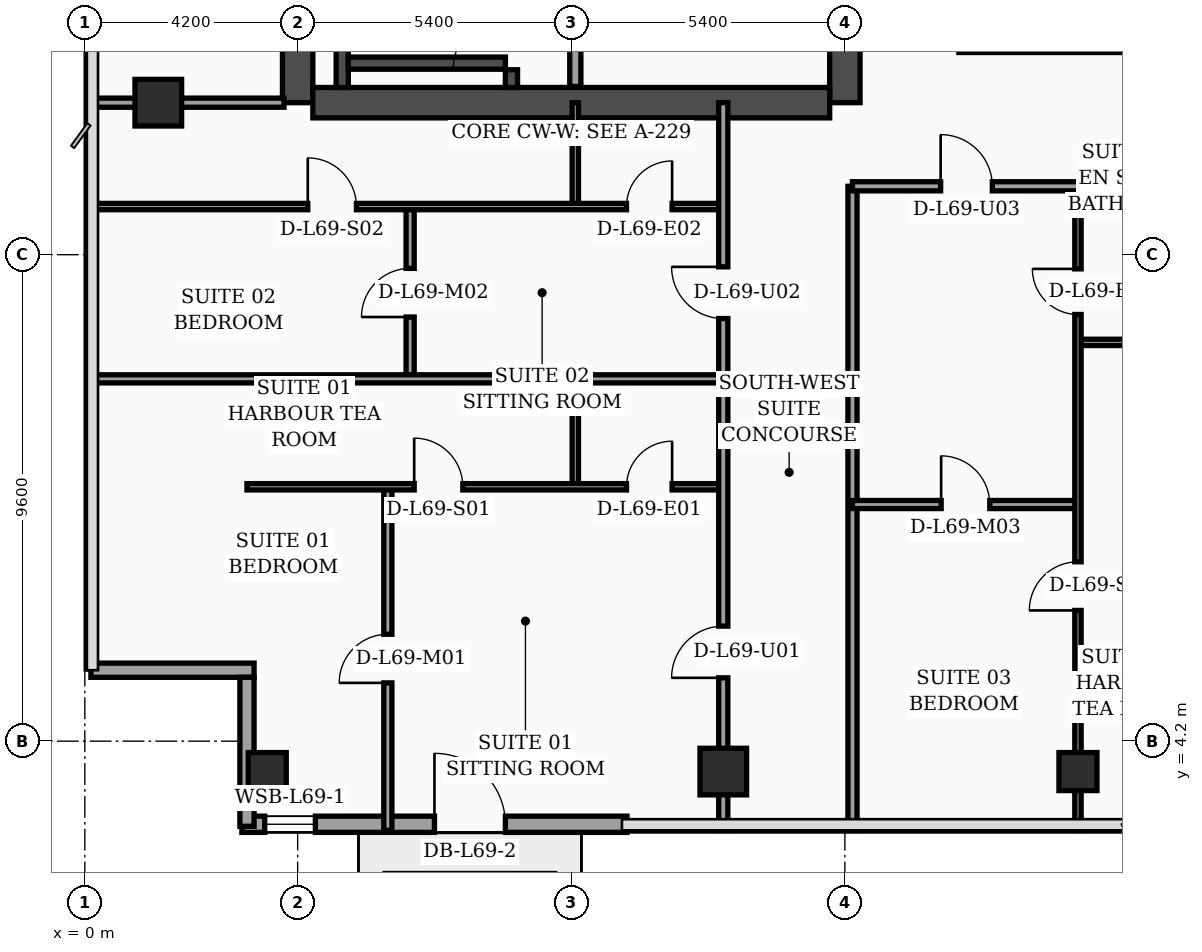
"""IFC4 building model, lengths in metres.
Left out: names, types, materials, properties, quantities, classifications, styles, units other than length and angle.
Written with IfcOpenShell. Run it as: python <this file> out.ifc"""

import sys

from ifc_helpers import new_model, si_unit, direction, frame, frame_2d, origin, origin_2d, place, context, subcontext, project, spatial, rectangle, hollow_rectangle, extrude, element, fill, save


model = new_model("IFC4")
c1 = context("Model", 3, precision=1e-05, world=origin(), true_north=direction((0.0, 1.0)))
c2 = subcontext(c1, "Body", "Model", "MODEL_VIEW")
j1 = project(units=[si_unit("LENGTHUNIT", "METRE"), si_unit("PLANEANGLEUNIT", "RADIAN")], contexts=[c1])
p1 = place(None, origin())
s1 = spatial("IfcSite", under=j1, at=p1, CompositionType="ELEMENT")
p2 = place(p1, origin())
s2 = spatial("IfcBuilding", under=s1, at=p2, CompositionType="ELEMENT")
p3 = place(p2, frame((0.0, 0.0, 278.7)))
s3 = spatial("IfcBuildingStorey", under=s2, at=p3, CompositionType="ELEMENT", Elevation=278.7)
p4 = place(p3, frame((4.2, 16.8, 0.0), z_axis=(0.0, 0.0, 1.0), x_axis=(0.0, 1.0, 0.0)))
e1 = element("IfcWall", 1, at=p4, inside=s3, PredefinedType="SHEAR", context=c2, shape_type="SweptSolid", body=[
    extrude(rectangle(XDim=21.6, YDim=0.6, at=frame_2d((10.8, 0.0))), origin(), (0.0, 0.0, 1.0), 3.52),
])
p5 = place(p3, frame((15.0, 16.8, 0.0), z_axis=(0.0, 0.0, 1.0), x_axis=(0.0, 1.0, 0.0)))
e2 = element("IfcWall", 2, at=p5, inside=s3, PredefinedType="SHEAR", context=c2, shape_type="SweptSolid", body=[
    extrude(rectangle(XDim=21.6, YDim=0.6, at=frame_2d((10.8, 0.0))), origin(), (0.0, 0.0, 1.0), 3.52),
])
p6 = place(p5, frame((8.65, 0.0, 0.0)))
e3 = element("IfcOpeningElement", 3, at=p6, cuts=e2, PredefinedType="OPENING", context=c2, shape_type="SweptSolid", body=[
    extrude(rectangle(XDim=1.1, YDim=2.2, at=frame_2d((0.55, 1.1))), frame((0.0, 0.31, 0.0), z_axis=(0.0, -1.0, 0.0), x_axis=(1.0, 0.0, 0.0)), (0.0, 0.0, 1.0), 0.62),
])
p7 = place(p5, frame((18.9, 0.0, 0.0)))
e4 = element("IfcOpeningElement", 4, at=p7, cuts=e2, PredefinedType="OPENING", context=c2, shape_type="SweptSolid", body=[
    extrude(rectangle(XDim=1.1, YDim=2.2, at=frame_2d((0.55, 1.1))), frame((0.0, 0.31, 0.0), z_axis=(0.0, -1.0, 0.0), x_axis=(1.0, 0.0, 0.0)), (0.0, 0.0, 1.0), 0.62),
])
p8 = place(p3, frame((4.5, 16.8, 0.0), z_axis=(0.0, 0.0, 1.0), x_axis=(1.0, 0.0, 0.0)))
e5 = element("IfcWall", 5, at=p8, inside=s3, PredefinedType="SHEAR", context=c2, shape_type="SweptSolid", body=[
    extrude(rectangle(XDim=10.2, YDim=0.6, at=frame_2d((5.1, 0.0))), origin(), (0.0, 0.0, 1.0), 3.52),
])
p9 = place(p3, frame((5.08, 17.1, 0.0), z_axis=(0.0, 0.0, 1.0), x_axis=(0.0, 1.0, 0.0)))
e6 = element("IfcWall", 6, at=p9, inside=s3, PredefinedType="SOLIDWALL", context=c2, shape_type="SweptSolid", body=[
    extrude(rectangle(XDim=9.69, YDim=0.24, at=frame_2d((4.845, 0.0))), origin(), (0.0, 0.0, 1.0), 3.52),
])
p10 = place(p3, frame((8.42, 17.1, 0.0), z_axis=(0.0, 0.0, 1.0), x_axis=(0.0, 1.0, 0.0)))
e7 = element("IfcWall", 7, at=p10, inside=s3, PredefinedType="SOLIDWALL", context=c2, shape_type="SweptSolid", body=[
    extrude(rectangle(XDim=9.69, YDim=0.24, at=frame_2d((4.845, 0.0))), origin(), (0.0, 0.0, 1.0), 3.52),
])
p11 = place(p10, frame((0.35, 0.0, 0.0)))
e8 = element("IfcOpeningElement", 8, at=p11, cuts=e7, PredefinedType="OPENING", context=c2, shape_type="SweptSolid", body=[
    extrude(rectangle(XDim=1.15, YDim=2.2, at=frame_2d((0.575, 1.1))), frame((0.0, 0.13, 0.0), z_axis=(0.0, -1.0, 0.0), x_axis=(1.0, 0.0, 0.0)), (0.0, 0.0, 1.0), 0.26),
])
p12 = place(p3, frame((5.2, 17.58, 0.0), z_axis=(0.0, 0.0, 1.0), x_axis=(1.0, 0.0, 0.0)))
e9 = element("IfcWall", 9, at=p12, inside=s3, PredefinedType="SOLIDWALL", context=c2, shape_type="SweptSolid", body=[
    extrude(rectangle(XDim=3.1, YDim=0.24, at=frame_2d((1.55, 0.0))), origin(), (0.0, 0.0, 1.0), 3.52),
])
p13 = place(p3, frame((3.6, 3.6, 0.0), z_axis=(0.0, 0.0, 1.0), x_axis=(1.0, 0.0, 0.0)))
e10 = element("IfcColumn", 10, at=p13, inside=s3, PredefinedType="COLUMN", context=c2, shape_type="SweptSolid", body=[
    extrude(hollow_rectangle(XDim=0.75, YDim=0.75, WallThickness=0.032, at=origin_2d()), origin(), (0.0, 0.0, 1.0), 3.52),
])
for number, where, z_axis, x_axis in (
    (11, (1.45, 16.8, 0.0), (0.0, 0.0, 1.0), (1.0, 0.0, 0.0)),
    (12, (12.6, 3.6, 0.0), (0.0, 0.0, 1.0), (1.0, 0.0, 0.0)),
):
    element("IfcColumn", number, at=place(p3, frame(where, z_axis=z_axis, x_axis=x_axis)), inside=s3, PredefinedType="COLUMN", context=c2, shape_type="SweptSolid", body=[
        extrude(rectangle(XDim=0.92, YDim=0.92, at=origin_2d()), origin(), (0.0, 0.0, 1.0), 3.52),
    ])
p14 = place(p3, frame((19.6, 3.6, 0.0), z_axis=(0.0, 0.0, 1.0), x_axis=(1.0, 0.0, 0.0)))
e13 = element("IfcColumn", 13, at=p14, inside=s3, PredefinedType="COLUMN", context=c2, shape_type="SweptSolid", body=[
    extrude(hollow_rectangle(XDim=0.75, YDim=0.75, WallThickness=0.032, at=origin_2d()), origin(), (0.0, 0.0, 1.0), 3.52),
])
p15 = place(p3, frame((3.1, 2.56, 0.0), z_axis=(0.0, 0.0, 1.0), x_axis=(1.0, 0.0, 0.0)))
e14 = element("IfcWall", 14, at=p15, inside=s3, PredefinedType="SOLIDWALL", context=c2, shape_type="SweptSolid", body=[
    extrude(rectangle(XDim=7.6, YDim=0.32, at=frame_2d((3.8, 0.0))), origin(), (0.0, 0.0, 1.0), 3.52),
])
p16 = place(p15, frame((0.45, 0.0, 0.75)))
e15 = element("IfcOpeningElement", 15, at=p16, cuts=e14, PredefinedType="OPENING", context=c2, shape_type="SweptSolid", body=[
    extrude(rectangle(XDim=1.0, YDim=1.6, at=frame_2d((0.5, 0.8))), frame((0.0, 0.17, 0.0), z_axis=(0.0, -1.0, 0.0), x_axis=(1.0, 0.0, 0.0)), (0.0, 0.0, 1.0), 0.34),
])
p17 = place(p15, frame((3.8, 0.0, 0.0)))
e16 = element("IfcOpeningElement", 16, at=p17, cuts=e14, PredefinedType="OPENING", context=c2, shape_type="SweptSolid", body=[
    extrude(rectangle(XDim=1.4, YDim=2.25, at=frame_2d((0.7, 1.125))), frame((0.0, 0.17, 0.0), z_axis=(0.0, -1.0, 0.0), x_axis=(1.0, 0.0, 0.0)), (0.0, 0.0, 1.0), 0.34),
])
p18 = place(p3, frame((0.12, 5.6, 0.0), z_axis=(0.0, 0.0, 1.0), x_axis=(1.0, 0.0, 0.0)))
e17 = element("IfcWall", 17, at=p18, inside=s3, PredefinedType="SOLIDWALL", context=c2, shape_type="SweptSolid", body=[
    extrude(rectangle(XDim=3.22, YDim=0.28, at=frame_2d((1.61, 0.0))), origin(), (0.0, 0.0, 1.0), 2.97),
])
p19 = place(p3, frame((3.2, 5.46, 0.0), z_axis=(0.0, 0.0, 1.0), x_axis=(0.0, -1.0, 0.0)))
e18 = element("IfcWall", 18, at=p19, inside=s3, PredefinedType="SOLIDWALL", context=c2, shape_type="SweptSolid", body=[
    extrude(rectangle(XDim=2.94, YDim=0.28, at=frame_2d((1.47, 0.0))), origin(), (0.0, 0.0, 1.0), 2.97),
])
p20 = place(p3, frame((9.68, 17.12, 0.0), z_axis=(0.0, 0.0, 1.0), x_axis=(0.0, 1.0, 0.0)))
e19 = element("IfcWall", 19, at=p20, inside=s3, PredefinedType="SOLIDWALL", context=c2, shape_type="SweptSolid", body=[
    extrude(rectangle(XDim=7.88, YDim=0.22, at=frame_2d((3.94, 0.0))), origin(), (0.0, 0.0, 1.0), 3.52),
])
p21 = place(p3, frame((0.08, 16.8, 0.0), z_axis=(0.0, 0.0, 1.0), x_axis=(1.0, 0.0, 0.0)))
e20 = element("IfcWall", 20, at=p21, inside=s3, PredefinedType="PARTITIONING", context=c2, shape_type="SweptSolid", body=[
    extrude(rectangle(XDim=3.85, YDim=0.18, at=frame_2d((1.925, 0.0))), origin(), (0.0, 0.0, 1.0), 2.97),
])
p22 = place(p3, frame((9.68, 9.22, 0.0), z_axis=(0.0, 0.0, 1.0), x_axis=(0.0, 1.0, 0.0)))
e21 = element("IfcWall", 21, at=p22, inside=s3, PredefinedType="PARTITIONING", context=c2, shape_type="SweptSolid", body=[
    extrude(rectangle(XDim=2.13, YDim=0.125, at=frame_2d((1.065, 0.0))), origin(), (0.0, 0.0, 1.0), 3.12),
])
p23 = place(p3, frame((5.98, 2.44, 0.0), z_axis=(0.0, 0.0, 1.0), x_axis=(0.0, 1.0, 0.0)))
e22 = element("IfcWall", 22, at=p23, inside=s3, PredefinedType="PARTITIONING", context=c2, shape_type="SweptSolid", body=[
    extrude(rectangle(XDim=6.78, YDim=0.16, at=frame_2d((3.39, 0.0))), origin(), (0.0, 0.0, 1.0), 3.07),
])
p24 = place(p23, frame((2.91, 0.0, 0.0)))
e23 = element("IfcOpeningElement", 23, at=p24, cuts=e22, PredefinedType="OPENING", context=c2, shape_type="SweptSolid", body=[
    extrude(rectangle(XDim=0.96, YDim=2.2, at=frame_2d((0.48, 1.1))), frame((0.0, 0.09, 0.0), z_axis=(0.0, -1.0, 0.0), x_axis=(1.0, 0.0, 0.0)), (0.0, 0.0, 1.0), 0.18),
])
p25 = place(p3, frame((3.2, 9.22, 0.0), z_axis=(0.0, 0.0, 1.0), x_axis=(1.0, 0.0, 0.0)))
e24 = element("IfcWall", 24, at=p25, inside=s3, PredefinedType="PARTITIONING", context=c2, shape_type="SweptSolid", body=[
    extrude(rectangle(XDim=9.4, YDim=0.125, at=frame_2d((4.7, 0.0))), origin(), (0.0, 0.0, 1.0), 2.97),
])
p26 = place(p25, frame((3.3, 0.0, 0.0)))
e25 = element("IfcOpeningElement", 25, at=p26, cuts=e24, PredefinedType="OPENING", context=c2, shape_type="SweptSolid", body=[
    extrude(rectangle(XDim=0.96, YDim=2.2, at=frame_2d((0.48, 1.1))), frame((0.0, 0.073, 0.0), z_axis=(0.0, -1.0, 0.0), x_axis=(1.0, 0.0, 0.0)), (0.0, 0.0, 1.0), 0.145),
])
p27 = place(p25, frame((7.49, 0.0, 0.0)))
e26 = element("IfcOpeningElement", 26, at=p27, cuts=e24, PredefinedType="OPENING", context=c2, shape_type="SweptSolid", body=[
    extrude(rectangle(XDim=0.9, YDim=2.15, at=frame_2d((0.45, 1.075))), frame((0.0, 0.073, 0.0), z_axis=(0.0, -1.0, 0.0), x_axis=(1.0, 0.0, 0.0)), (0.0, 0.0, 1.0), 0.145),
])
p28 = place(p3, frame((9.68, 14.75, 0.0), z_axis=(0.0, 0.0, 1.0), x_axis=(0.0, 1.0, 0.0)))
e27 = element("IfcWall", 27, at=p28, inside=s3, PredefinedType="PARTITIONING", context=c2, shape_type="SweptSolid", body=[
    extrude(rectangle(XDim=2.05, YDim=0.125, at=frame_2d((1.025, 0.0))), origin(), (0.0, 0.0, 1.0), 3.52),
])
p29 = place(p3, frame((6.42, 11.35, 0.0), z_axis=(0.0, 0.0, 1.0), x_axis=(0.0, 1.0, 0.0)))
e28 = element("IfcWall", 28, at=p29, inside=s3, PredefinedType="PARTITIONING", context=c2, shape_type="SweptSolid", body=[
    extrude(rectangle(XDim=3.4, YDim=0.16, at=frame_2d((1.7, 0.0))), origin(), (0.0, 0.0, 1.0), 3.52),
])
p30 = place(p29, frame((1.22, 0.0, 0.0)))
e29 = element("IfcOpeningElement", 29, at=p30, cuts=e28, PredefinedType="OPENING", context=c2, shape_type="SweptSolid", body=[
    extrude(rectangle(XDim=0.96, YDim=2.2, at=frame_2d((0.48, 1.1))), frame((0.0, 0.09, 0.0), z_axis=(0.0, -1.0, 0.0), x_axis=(1.0, 0.0, 0.0)), (0.0, 0.0, 1.0), 0.18),
])
p31 = place(p3, frame((0.08, 14.75, 0.0), z_axis=(0.0, 0.0, 1.0), x_axis=(1.0, 0.0, 0.0)))
e30 = element("IfcWall", 30, at=p31, inside=s3, PredefinedType="PARTITIONING", context=c2, shape_type="SweptSolid", body=[
    extrude(rectangle(XDim=12.52, YDim=0.125, at=frame_2d((6.26, 0.0))), origin(), (0.0, 0.0, 1.0), 2.97),
])
p32 = place(p31, frame((4.32, 0.0, 0.0)))
e31 = element("IfcOpeningElement", 31, at=p32, cuts=e30, PredefinedType="OPENING", context=c2, shape_type="SweptSolid", body=[
    extrude(rectangle(XDim=0.96, YDim=2.2, at=frame_2d((0.48, 1.1))), frame((0.0, 0.073, 0.0), z_axis=(0.0, -1.0, 0.0), x_axis=(1.0, 0.0, 0.0)), (0.0, 0.0, 1.0), 0.145),
])
p33 = place(p31, frame((10.61, 0.0, 0.0)))
e32 = element("IfcOpeningElement", 32, at=p33, cuts=e30, PredefinedType="OPENING", context=c2, shape_type="SweptSolid", body=[
    extrude(rectangle(XDim=0.9, YDim=2.15, at=frame_2d((0.45, 1.075))), frame((0.0, 0.073, 0.0), z_axis=(0.0, -1.0, 0.0), x_axis=(1.0, 0.0, 0.0)), (0.0, 0.0, 1.0), 0.145),
])
p34 = place(p3, frame((0.08, 11.35, 0.0), z_axis=(0.0, 0.0, 1.0), x_axis=(1.0, 0.0, 0.0)))
e33 = element("IfcWall", 33, at=p34, inside=s3, PredefinedType="PARTITIONING", context=c2, shape_type="SweptSolid", body=[
    extrude(rectangle(XDim=12.52, YDim=0.16, at=frame_2d((6.26, 0.0))), origin(), (0.0, 0.0, 1.0), 2.97),
])
p35 = place(p3, frame((12.6, 2.44, 0.0), z_axis=(0.0, 0.0, 1.0), x_axis=(0.0, 1.0, 0.0)))
e34 = element("IfcWall", 34, at=p35, inside=s3, PredefinedType="PARTITIONING", context=c2, shape_type="SweptSolid", body=[
    extrude(rectangle(XDim=14.36, YDim=0.18, at=frame_2d((7.18, 0.0))), origin(), (0.0, 0.0, 1.0), 2.97),
])
p36 = place(p35, frame((3.01, 0.0, 0.0)))
e35 = element("IfcOpeningElement", 35, at=p36, cuts=e34, PredefinedType="OPENING", context=c2, shape_type="SweptSolid", body=[
    extrude(rectangle(XDim=1.02, YDim=2.2, at=frame_2d((0.51, 1.1))), frame((0.0, 0.1, 0.0), z_axis=(0.0, -1.0, 0.0), x_axis=(1.0, 0.0, 0.0)), (0.0, 0.0, 1.0), 0.2),
])
p37 = place(p35, frame((10.1, 0.0, 0.0)))
e36 = element("IfcOpeningElement", 36, at=p37, cuts=e34, PredefinedType="OPENING", context=c2, shape_type="SweptSolid", body=[
    extrude(rectangle(XDim=1.02, YDim=2.2, at=frame_2d((0.51, 1.1))), frame((0.0, 0.1, 0.0), z_axis=(0.0, -1.0, 0.0), x_axis=(1.0, 0.0, 0.0)), (0.0, 0.0, 1.0), 0.2),
])
p38 = place(p3, frame((15.15, 2.44, 0.0), z_axis=(0.0, 0.0, 1.0), x_axis=(0.0, 1.0, 0.0)))
e37 = element("IfcWall", 37, at=p38, inside=s3, PredefinedType="PARTITIONING", context=c2, shape_type="SweptSolid", body=[
    extrude(rectangle(XDim=12.71, YDim=0.18, at=frame_2d((6.355, 0.0))), origin(), (0.0, 0.0, 1.0), 3.07),
])
p39 = place(p3, frame((19.6, 12.07, 0.0), z_axis=(0.0, 0.0, 1.0), x_axis=(1.0, 0.0, 0.0)))
e38 = element("IfcWall", 38, at=p39, inside=s3, PredefinedType="PARTITIONING", context=c2, shape_type="SweptSolid", body=[
    extrude(rectangle(XDim=2.0, YDim=0.125, at=frame_2d((1.0, 0.0))), origin(), (0.0, 0.0, 1.0), 3.52),
])
p40 = place(p3, frame((15.15, 8.87, 0.0), z_axis=(0.0, 0.0, 1.0), x_axis=(1.0, 0.0, 0.0)))
e39 = element("IfcWall", 39, at=p40, inside=s3, PredefinedType="PARTITIONING", context=c2, shape_type="SweptSolid", body=[
    extrude(rectangle(XDim=4.45, YDim=0.16, at=frame_2d((2.225, 0.0))), origin(), (0.0, 0.0, 1.0), 3.52),
])
p41 = place(p40, frame((1.75, 0.0, 0.0)))
e40 = element("IfcOpeningElement", 40, at=p41, cuts=e39, PredefinedType="OPENING", context=c2, shape_type="SweptSolid", body=[
    extrude(rectangle(XDim=0.96, YDim=2.2, at=frame_2d((0.48, 1.1))), frame((0.0, 0.09, 0.0), z_axis=(0.0, -1.0, 0.0), x_axis=(1.0, 0.0, 0.0)), (0.0, 0.0, 1.0), 0.18),
])
p42 = place(p3, frame((19.6, 2.44, 0.0), z_axis=(0.0, 0.0, 1.0), x_axis=(0.0, 1.0, 0.0)))
e41 = element("IfcWall", 41, at=p42, inside=s3, PredefinedType="PARTITIONING", context=c2, shape_type="SweptSolid", body=[
    extrude(rectangle(XDim=12.71, YDim=0.125, at=frame_2d((6.355, 0.0))), origin(), (0.0, 0.0, 1.0), 2.57),
])
p43 = place(p42, frame((4.34, 0.0, 0.0)))
e42 = element("IfcOpeningElement", 42, at=p43, cuts=e41, PredefinedType="OPENING", context=c2, shape_type="SweptSolid", body=[
    extrude(rectangle(XDim=0.96, YDim=2.2, at=frame_2d((0.48, 1.1))), frame((0.0, 0.073, 0.0), z_axis=(0.0, -1.0, 0.0), x_axis=(1.0, 0.0, 0.0)), (0.0, 0.0, 1.0), 0.145),
])
p44 = place(p42, frame((10.18, 0.0, 0.0)))
e43 = element("IfcOpeningElement", 43, at=p44, cuts=e41, PredefinedType="OPENING", context=c2, shape_type="SweptSolid", body=[
    extrude(rectangle(XDim=0.9, YDim=2.15, at=frame_2d((0.45, 1.075))), frame((0.0, 0.073, 0.0), z_axis=(0.0, -1.0, 0.0), x_axis=(1.0, 0.0, 0.0)), (0.0, 0.0, 1.0), 0.145),
])
p45 = place(p3, frame((15.15, 15.15, 0.0), z_axis=(0.0, 0.0, 1.0), x_axis=(1.0, 0.0, 0.0)))
e44 = element("IfcWall", 44, at=p45, inside=s3, PredefinedType="PARTITIONING", context=c2, shape_type="SweptSolid", body=[
    extrude(rectangle(XDim=6.45, YDim=0.18, at=frame_2d((3.225, 0.0))), origin(), (0.0, 0.0, 1.0), 2.57),
])
p46 = place(p45, frame((1.74, 0.0, 0.0)))
e45 = element("IfcOpeningElement", 45, at=p46, cuts=e44, PredefinedType="OPENING", context=c2, shape_type="SweptSolid", body=[
    extrude(rectangle(XDim=1.02, YDim=2.2, at=frame_2d((0.51, 1.1))), frame((0.0, 0.1, 0.0), z_axis=(0.0, -1.0, 0.0), x_axis=(1.0, 0.0, 0.0)), (0.0, 0.0, 1.0), 0.2),
])
p47 = place(p3, frame((17.25, 17.88, 0.0), z_axis=(0.0, 0.0, 1.0), x_axis=(1.0, 0.0, 0.0)))
e46 = element("IfcWall", 46, at=p47, inside=s3, PredefinedType="PARTITIONING", context=c2, shape_type="SweptSolid", body=[
    extrude(rectangle(XDim=4.3, YDim=0.18, at=frame_2d((2.15, 0.0))), origin(), (0.0, 0.0, 1.0), 3.52),
])
p48 = place(p16, origin())
e47 = element("IfcWindow", 47, at=p48, inside=s3, PartitioningType="SINGLE_PANEL", PredefinedType="WINDOW", context=c2, shape_type="SweptSolid", body=[
    extrude(rectangle(XDim=1.0, YDim=1.6, at=frame_2d((0.5, 0.8))), frame((0.0, 0.03, 0.0), z_axis=(0.0, -1.0, 0.0), x_axis=(1.0, 0.0, 0.0)), (0.0, 0.0, 1.0), 0.06),
])
fill(e15, e47)
p49 = place(p17, origin())
e48 = element("IfcDoor", 48, at=p49, inside=s3, OperationType="SINGLE_SWING_LEFT", PredefinedType="DOOR", context=c2, shape_type="SweptSolid", body=[
    extrude(rectangle(XDim=1.4, YDim=2.25, at=frame_2d((0.7, 1.125))), frame((0.0, 0.025, 0.0), z_axis=(0.0, -1.0, 0.0), x_axis=(1.0, 0.0, 0.0)), (0.0, 0.0, 1.0), 0.05),
])
fill(e16, e48)
p50 = place(p24, origin())
e49 = element("IfcDoor", 49, at=p50, inside=s3, OperationType="SINGLE_SWING_LEFT", PredefinedType="DOOR", context=c2, shape_type="SweptSolid", body=[
    extrude(rectangle(XDim=0.96, YDim=2.2, at=frame_2d((0.48, 1.1))), frame((0.0, 0.025, 0.0), z_axis=(0.0, -1.0, 0.0), x_axis=(1.0, 0.0, 0.0)), (0.0, 0.0, 1.0), 0.05),
])
fill(e23, e49)
p51 = place(p26, origin())
e50 = element("IfcDoor", 50, at=p51, inside=s3, OperationType="SINGLE_SWING_LEFT", PredefinedType="DOOR", context=c2, shape_type="SweptSolid", body=[
    extrude(rectangle(XDim=0.96, YDim=2.2, at=frame_2d((0.48, 1.1))), frame((0.0, 0.025, 0.0), z_axis=(0.0, -1.0, 0.0), x_axis=(1.0, 0.0, 0.0)), (0.0, 0.0, 1.0), 0.05),
])
fill(e25, e50)
p52 = place(p27, origin())
e51 = element("IfcDoor", 51, at=p52, inside=s3, OperationType="SINGLE_SWING_RIGHT", PredefinedType="DOOR", context=c2, shape_type="SweptSolid", body=[
    extrude(rectangle(XDim=0.9, YDim=2.15, at=frame_2d((0.45, 1.075))), frame((0.0, 0.025, 0.0), z_axis=(0.0, -1.0, 0.0), x_axis=(1.0, 0.0, 0.0)), (0.0, 0.0, 1.0), 0.05),
])
fill(e26, e51)
p53 = place(p30, origin())
e52 = element("IfcDoor", 52, at=p53, inside=s3, OperationType="SINGLE_SWING_LEFT", PredefinedType="DOOR", context=c2, shape_type="SweptSolid", body=[
    extrude(rectangle(XDim=0.96, YDim=2.2, at=frame_2d((0.48, 1.1))), frame((0.0, 0.025, 0.0), z_axis=(0.0, -1.0, 0.0), x_axis=(1.0, 0.0, 0.0)), (0.0, 0.0, 1.0), 0.05),
])
fill(e29, e52)
p54 = place(p32, origin())
e53 = element("IfcDoor", 53, at=p54, inside=s3, OperationType="SINGLE_SWING_LEFT", PredefinedType="DOOR", context=c2, shape_type="SweptSolid", body=[
    extrude(rectangle(XDim=0.96, YDim=2.2, at=frame_2d((0.48, 1.1))), frame((0.0, 0.025, 0.0), z_axis=(0.0, -1.0, 0.0), x_axis=(1.0, 0.0, 0.0)), (0.0, 0.0, 1.0), 0.05),
])
fill(e31, e53)
p55 = place(p33, origin())
e54 = element("IfcDoor", 54, at=p55, inside=s3, OperationType="SINGLE_SWING_RIGHT", PredefinedType="DOOR", context=c2, shape_type="SweptSolid", body=[
    extrude(rectangle(XDim=0.9, YDim=2.15, at=frame_2d((0.45, 1.075))), frame((0.0, 0.025, 0.0), z_axis=(0.0, -1.0, 0.0), x_axis=(1.0, 0.0, 0.0)), (0.0, 0.0, 1.0), 0.05),
])
fill(e32, e54)
p56 = place(p36, origin())
e55 = element("IfcDoor", 55, at=p56, inside=s3, OperationType="SINGLE_SWING_LEFT", PredefinedType="DOOR", context=c2, shape_type="SweptSolid", body=[
    extrude(rectangle(XDim=1.02, YDim=2.2, at=frame_2d((0.51, 1.1))), frame((0.0, 0.025, 0.0), z_axis=(0.0, -1.0, 0.0), x_axis=(1.0, 0.0, 0.0)), (0.0, 0.0, 1.0), 0.05),
])
fill(e35, e55)
p57 = place(p37, origin())
e56 = element("IfcDoor", 56, at=p57, inside=s3, OperationType="SINGLE_SWING_RIGHT", PredefinedType="DOOR", context=c2, shape_type="SweptSolid", body=[
    extrude(rectangle(XDim=1.02, YDim=2.2, at=frame_2d((0.51, 1.1))), frame((0.0, 0.025, 0.0), z_axis=(0.0, -1.0, 0.0), x_axis=(1.0, 0.0, 0.0)), (0.0, 0.0, 1.0), 0.05),
])
fill(e36, e56)
p58 = place(p41, origin())
e57 = element("IfcDoor", 57, at=p58, inside=s3, OperationType="SINGLE_SWING_LEFT", PredefinedType="DOOR", context=c2, shape_type="SweptSolid", body=[
    extrude(rectangle(XDim=0.96, YDim=2.2, at=frame_2d((0.48, 1.1))), frame((0.0, 0.025, 0.0), z_axis=(0.0, -1.0, 0.0), x_axis=(1.0, 0.0, 0.0)), (0.0, 0.0, 1.0), 0.05),
])
fill(e40, e57)
p59 = place(p43, origin())
e58 = element("IfcDoor", 58, at=p59, inside=s3, OperationType="SINGLE_SWING_LEFT", PredefinedType="DOOR", context=c2, shape_type="SweptSolid", body=[
    extrude(rectangle(XDim=0.96, YDim=2.2, at=frame_2d((0.48, 1.1))), frame((0.0, 0.025, 0.0), z_axis=(0.0, -1.0, 0.0), x_axis=(1.0, 0.0, 0.0)), (0.0, 0.0, 1.0), 0.05),
])
fill(e42, e58)
p60 = place(p44, origin())
e59 = element("IfcDoor", 59, at=p60, inside=s3, OperationType="SINGLE_SWING_RIGHT", PredefinedType="DOOR", context=c2, shape_type="SweptSolid", body=[
    extrude(rectangle(XDim=0.9, YDim=2.15, at=frame_2d((0.45, 1.075))), frame((0.0, 0.025, 0.0), z_axis=(0.0, -1.0, 0.0), x_axis=(1.0, 0.0, 0.0)), (0.0, 0.0, 1.0), 0.05),
])
fill(e43, e59)
p61 = place(p46, origin())
e60 = element("IfcDoor", 60, at=p61, inside=s3, OperationType="SINGLE_SWING_LEFT", PredefinedType="DOOR", context=c2, shape_type="SweptSolid", body=[
    extrude(rectangle(XDim=1.02, YDim=2.2, at=frame_2d((0.51, 1.1))), frame((0.0, 0.025, 0.0), z_axis=(0.0, -1.0, 0.0), x_axis=(1.0, 0.0, 0.0)), (0.0, 0.0, 1.0), 0.05),
])
fill(e45, e60)
p62 = place(p11, origin())
e61 = element("IfcDoor", 61, at=p62, inside=s3, OperationType="SINGLE_SWING_LEFT", PredefinedType="DOOR", context=c2, shape_type="SweptSolid", body=[
    extrude(rectangle(XDim=1.15, YDim=2.2, at=frame_2d((0.575, 1.1))), frame((0.0, 0.025, 0.0), z_axis=(0.0, -1.0, 0.0), x_axis=(1.0, 0.0, 0.0)), (0.0, 0.0, 1.0), 0.05),
])
fill(e8, e61)
save(model, sys.argv[1])
